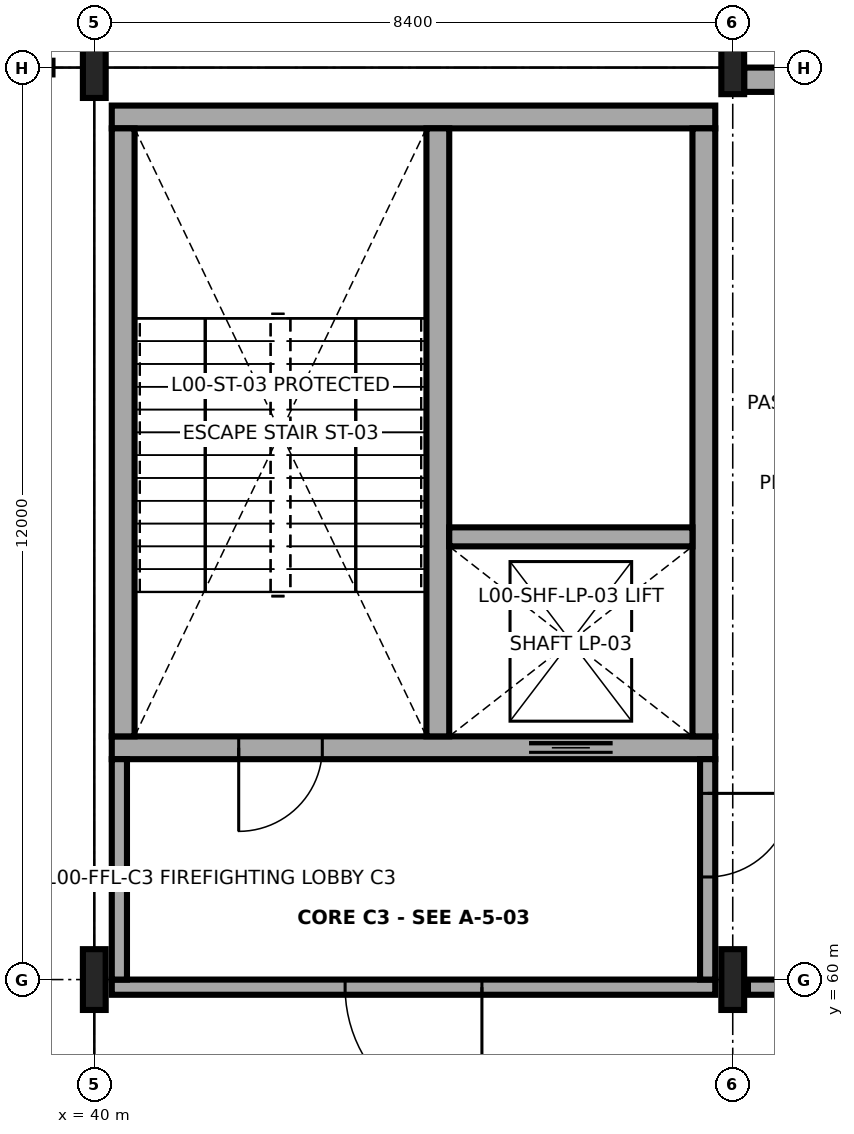
"""IFC4 building model, lengths in metres.
Left out: names, types, materials, properties, quantities, classifications, styles, units other than length and angle.
Written with IfcOpenShell. Run it as: python <this file> out.ifc"""

import sys

from ifc_helpers import new_model, si_unit, direction, frame, frame_2d, origin, origin_2d, place, context, subcontext, project, spatial, rectangle, i_section, extrude, element, fill, save


model = new_model("IFC4")
c1 = context("Model", 3, precision=1e-05, world=origin(), true_north=direction((0.0, 1.0)))
c2 = subcontext(c1, "Body", "Model", "MODEL_VIEW")
j1 = project(units=[si_unit("LENGTHUNIT", "METRE"), si_unit("PLANEANGLEUNIT", "RADIAN")], contexts=[c1])
p1 = place(None, origin())
s1 = spatial("IfcSite", under=j1, at=p1, CompositionType="ELEMENT")
p2 = place(p1, origin())
s2 = spatial("IfcBuilding", under=s1, at=p2, CompositionType="ELEMENT")
p3 = place(p2, origin())
s3 = spatial("IfcBuildingStorey", under=s2, at=p3, CompositionType="ELEMENT", Elevation=0.0)
for number, where, z_axis, x_axis in (
    (1, (40.0, 60.0, 0.0), (0.0, 0.0, 1.0), (1.0, 0.0, 0.0)),
    (2, (40.0, 72.0, 0.0), (0.0, 0.0, 1.0), (1.0, 0.0, 0.0)),
    (3, (48.4, 60.0, 0.0), (0.0, 0.0, 1.0), (1.0, 0.0, 0.0)),
):
    element("IfcColumn", number, at=place(p3, frame(where, z_axis=z_axis, x_axis=x_axis)), inside=s3, PredefinedType="COLUMN", context=c2, shape_type="SweptSolid", body=[
        extrude(i_section(OverallWidth=0.3, OverallDepth=0.8, WebThickness=0.018, FlangeThickness=0.033, FilletRadius=0.03, at=origin_2d()), origin(), (0.0, 0.0, 1.0), 8.4),
    ])
p4 = place(p3, frame((48.4, 72.0, 0.0), z_axis=(0.0, 0.0, 1.0), x_axis=(1.0, 0.0, 0.0)))
e4 = element("IfcColumn", 4, at=p4, inside=s3, PredefinedType="COLUMN", context=c2, shape_type="SweptSolid", body=[
    extrude(i_section(OverallWidth=0.3, OverallDepth=0.7, WebThickness=0.017, FlangeThickness=0.032, FilletRadius=0.027, at=origin_2d()), origin(), (0.0, 0.0, 1.0), 8.4),
])
p5 = place(p3, frame((51.9, 71.84, 0.0), z_axis=(0.0, 0.0, 1.0), x_axis=(-1.0, 0.0, 0.0)))
e5 = element("IfcWall", 5, at=p5, inside=s3, PredefinedType="SOLIDWALL", context=c2, shape_type="SweptSolid", body=[
    extrude(rectangle(XDim=3.35, YDim=0.32, at=frame_2d((1.675, 0.0))), origin(), (0.0, 0.0, 1.0), 7.78),
])
p6 = place(p5, frame((1.15, 0.0, 0.0)))
e6 = element("IfcOpeningElement", 6, at=p6, cuts=e5, PredefinedType="OPENING", context=c2, shape_type="SweptSolid", body=[
    extrude(rectangle(XDim=1.2, YDim=2.2, at=frame_2d((0.6, 1.1))), frame((0.0, 0.17, 0.0), z_axis=(0.0, -1.0, 0.0), x_axis=(1.0, 0.0, 0.0)), (0.0, 0.0, 1.0), 0.34),
])
p7 = place(p3, frame((40.23, 63.05, 0.0), z_axis=(0.0, 0.0, 1.0), x_axis=(1.0, 0.0, 0.0)))
e7 = element("IfcWall", 7, at=p7, inside=s3, PredefinedType="SHEAR", context=c2, shape_type="SweptSolid", body=[
    extrude(rectangle(XDim=7.94, YDim=0.3, at=frame_2d((3.97, 0.0))), origin(), (0.0, 0.0, 1.0), 8.15),
])
p8 = place(p7, frame((1.67, 0.0, 0.0)))
e8 = element("IfcOpeningElement", 8, at=p8, cuts=e7, PredefinedType="OPENING", context=c2, shape_type="SweptSolid", body=[
    extrude(rectangle(XDim=1.1, YDim=2.2, at=frame_2d((0.55, 1.1))), frame((0.0, 0.16, 0.0), z_axis=(0.0, -1.0, 0.0), x_axis=(1.0, 0.0, 0.0)), (0.0, 0.0, 1.0), 0.32),
])
p9 = place(p7, frame((5.49, 0.0, 0.0)))
e9 = element("IfcOpeningElement", 9, at=p9, cuts=e7, PredefinedType="OPENING", context=c2, shape_type="SweptSolid", body=[
    extrude(rectangle(XDim=1.1, YDim=2.1, at=frame_2d((0.55, 1.05))), frame((0.0, 0.16, 0.0), z_axis=(0.0, -1.0, 0.0), x_axis=(1.0, 0.0, 0.0)), (0.0, 0.0, 1.0), 0.32),
])
p10 = place(p3, frame((48.17, 71.35, 0.0), z_axis=(0.0, 0.0, 1.0), x_axis=(-1.0, 0.0, 0.0)))
e10 = element("IfcWall", 10, at=p10, inside=s3, PredefinedType="SHEAR", context=c2, shape_type="SweptSolid", body=[
    extrude(rectangle(XDim=7.94, YDim=0.3, at=frame_2d((3.97, 0.0))), origin(), (0.0, 0.0, 1.0), 8.15),
])
for number, where, z_axis, x_axis in (
    (11, (40.38, 71.2, 0.0), (0.0, 0.0, 1.0), (0.0, -1.0, 0.0)),
    (12, (48.02, 63.2, 0.0), (0.0, 0.0, 1.0), (0.0, 1.0, 0.0)),
    (13, (44.52, 63.2, 0.0), (0.0, 0.0, 1.0), (0.0, 1.0, 0.0)),
):
    element("IfcWall", number, at=place(p3, frame(where, z_axis=z_axis, x_axis=x_axis)), inside=s3, PredefinedType="SHEAR", context=c2, shape_type="SweptSolid", body=[
        extrude(rectangle(XDim=8.0, YDim=0.3, at=frame_2d((4.0, 0.0))), origin(), (0.0, 0.0, 1.0), 8.15),
    ])
p11 = place(p3, frame((44.67, 65.825, 0.0), z_axis=(0.0, 0.0, 1.0), x_axis=(1.0, 0.0, 0.0)))
e14 = element("IfcWall", 14, at=p11, inside=s3, PredefinedType="SHEAR", context=c2, shape_type="SweptSolid", body=[
    extrude(rectangle(XDim=3.2, YDim=0.25, at=frame_2d((1.6, 0.0))), origin(), (0.0, 0.0, 1.0), 8.15),
])
p12 = place(p3, frame((48.17, 59.9, 0.0), z_axis=(0.0, 0.0, 1.0), x_axis=(-1.0, 0.0, 0.0)))
e15 = element("IfcWall", 15, at=p12, inside=s3, PredefinedType="SOLIDWALL", context=c2, shape_type="SweptSolid", body=[
    extrude(rectangle(XDim=7.94, YDim=0.2, at=frame_2d((3.97, 0.0))), origin(), (0.0, 0.0, 1.0), 7.432),
])
p13 = place(p12, frame((3.07, 0.0, 0.0)))
e16 = element("IfcOpeningElement", 16, at=p13, cuts=e15, PredefinedType="OPENING", context=c2, shape_type="SweptSolid", body=[
    extrude(rectangle(XDim=1.8, YDim=2.2, at=frame_2d((0.9, 1.1))), frame((0.0, 0.11, 0.0), z_axis=(0.0, -1.0, 0.0), x_axis=(1.0, 0.0, 0.0)), (0.0, 0.0, 1.0), 0.22),
])
p14 = place(p3, frame((40.33, 60.0, 0.0), z_axis=(0.0, 0.0, 1.0), x_axis=(0.0, 1.0, 0.0)))
e17 = element("IfcWall", 17, at=p14, inside=s3, PredefinedType="SOLIDWALL", context=c2, shape_type="SweptSolid", body=[
    extrude(rectangle(XDim=2.9, YDim=0.2, at=frame_2d((1.45, 0.0))), origin(), (0.0, 0.0, 1.0), 7.582),
])
p15 = place(p3, frame((48.07, 62.9, 0.0), z_axis=(0.0, 0.0, 1.0), x_axis=(0.0, -1.0, 0.0)))
e18 = element("IfcWall", 18, at=p15, inside=s3, PredefinedType="SOLIDWALL", context=c2, shape_type="SweptSolid", body=[
    extrude(rectangle(XDim=2.9, YDim=0.2, at=frame_2d((1.45, 0.0))), origin(), (0.0, 0.0, 1.0), 7.582),
])
p16 = place(p15, frame((0.45, 0.0, 0.0)))
e19 = element("IfcOpeningElement", 19, at=p16, cuts=e18, PredefinedType="OPENING", context=c2, shape_type="SweptSolid", body=[
    extrude(rectangle(XDim=1.1, YDim=2.2, at=frame_2d((0.55, 1.1))), frame((0.0, 0.11, 0.0), z_axis=(0.0, -1.0, 0.0), x_axis=(1.0, 0.0, 0.0)), (0.0, 0.0, 1.0), 0.22),
])
p17 = place(p3, frame((51.7, 59.9, 0.0), z_axis=(0.0, 0.0, 1.0), x_axis=(-1.0, 0.0, 0.0)))
e20 = element("IfcWall", 20, at=p17, inside=s3, PredefinedType="SOLIDWALL", context=c2, shape_type="SweptSolid", body=[
    extrude(rectangle(XDim=3.1, YDim=0.2, at=frame_2d((1.55, 0.0))), origin(), (0.0, 0.0, 1.0), 7.432),
])
p18 = place(p8, origin())
e21 = element("IfcDoor", 21, at=p18, inside=s3, OperationType="SINGLE_SWING_RIGHT", PredefinedType="DOOR", context=c2, shape_type="SweptSolid", body=[
    extrude(rectangle(XDim=1.1, YDim=2.2, at=frame_2d((0.55, 1.1))), frame((0.0, 0.025, 0.0), z_axis=(0.0, -1.0, 0.0), x_axis=(1.0, 0.0, 0.0)), (0.0, 0.0, 1.0), 0.05),
])
fill(e8, e21)
p19 = place(p9, origin())
e22 = element("IfcDoor", 22, at=p19, inside=s3, OperationType="SLIDING_TO_LEFT", PredefinedType="DOOR", context=c2, shape_type="SweptSolid", body=[
    extrude(rectangle(XDim=1.1, YDim=2.1, at=frame_2d((0.55, 1.05))), frame((0.0, 0.025, 0.0), z_axis=(0.0, -1.0, 0.0), x_axis=(1.0, 0.0, 0.0)), (0.0, 0.0, 1.0), 0.05),
])
fill(e9, e22)
p20 = place(p13, origin())
e23 = element("IfcDoor", 23, at=p20, inside=s3, OperationType="DOUBLE_DOOR_SINGLE_SWING", PredefinedType="DOOR", context=c2, shape_type="SweptSolid", body=[
    extrude(rectangle(XDim=1.8, YDim=2.2, at=frame_2d((0.9, 1.1))), frame((0.0, 0.025, 0.0), z_axis=(0.0, -1.0, 0.0), x_axis=(1.0, 0.0, 0.0)), (0.0, 0.0, 1.0), 0.05),
])
fill(e16, e23)
p21 = place(p16, origin())
e24 = element("IfcDoor", 24, at=p21, inside=s3, OperationType="SINGLE_SWING_LEFT", PredefinedType="DOOR", context=c2, shape_type="SweptSolid", body=[
    extrude(rectangle(XDim=1.1, YDim=2.2, at=frame_2d((0.55, 1.1))), frame((0.0, 0.025, 0.0), z_axis=(0.0, -1.0, 0.0), x_axis=(1.0, 0.0, 0.0)), (0.0, 0.0, 1.0), 0.05),
])
fill(e19, e24)
save(model, sys.argv[1])
